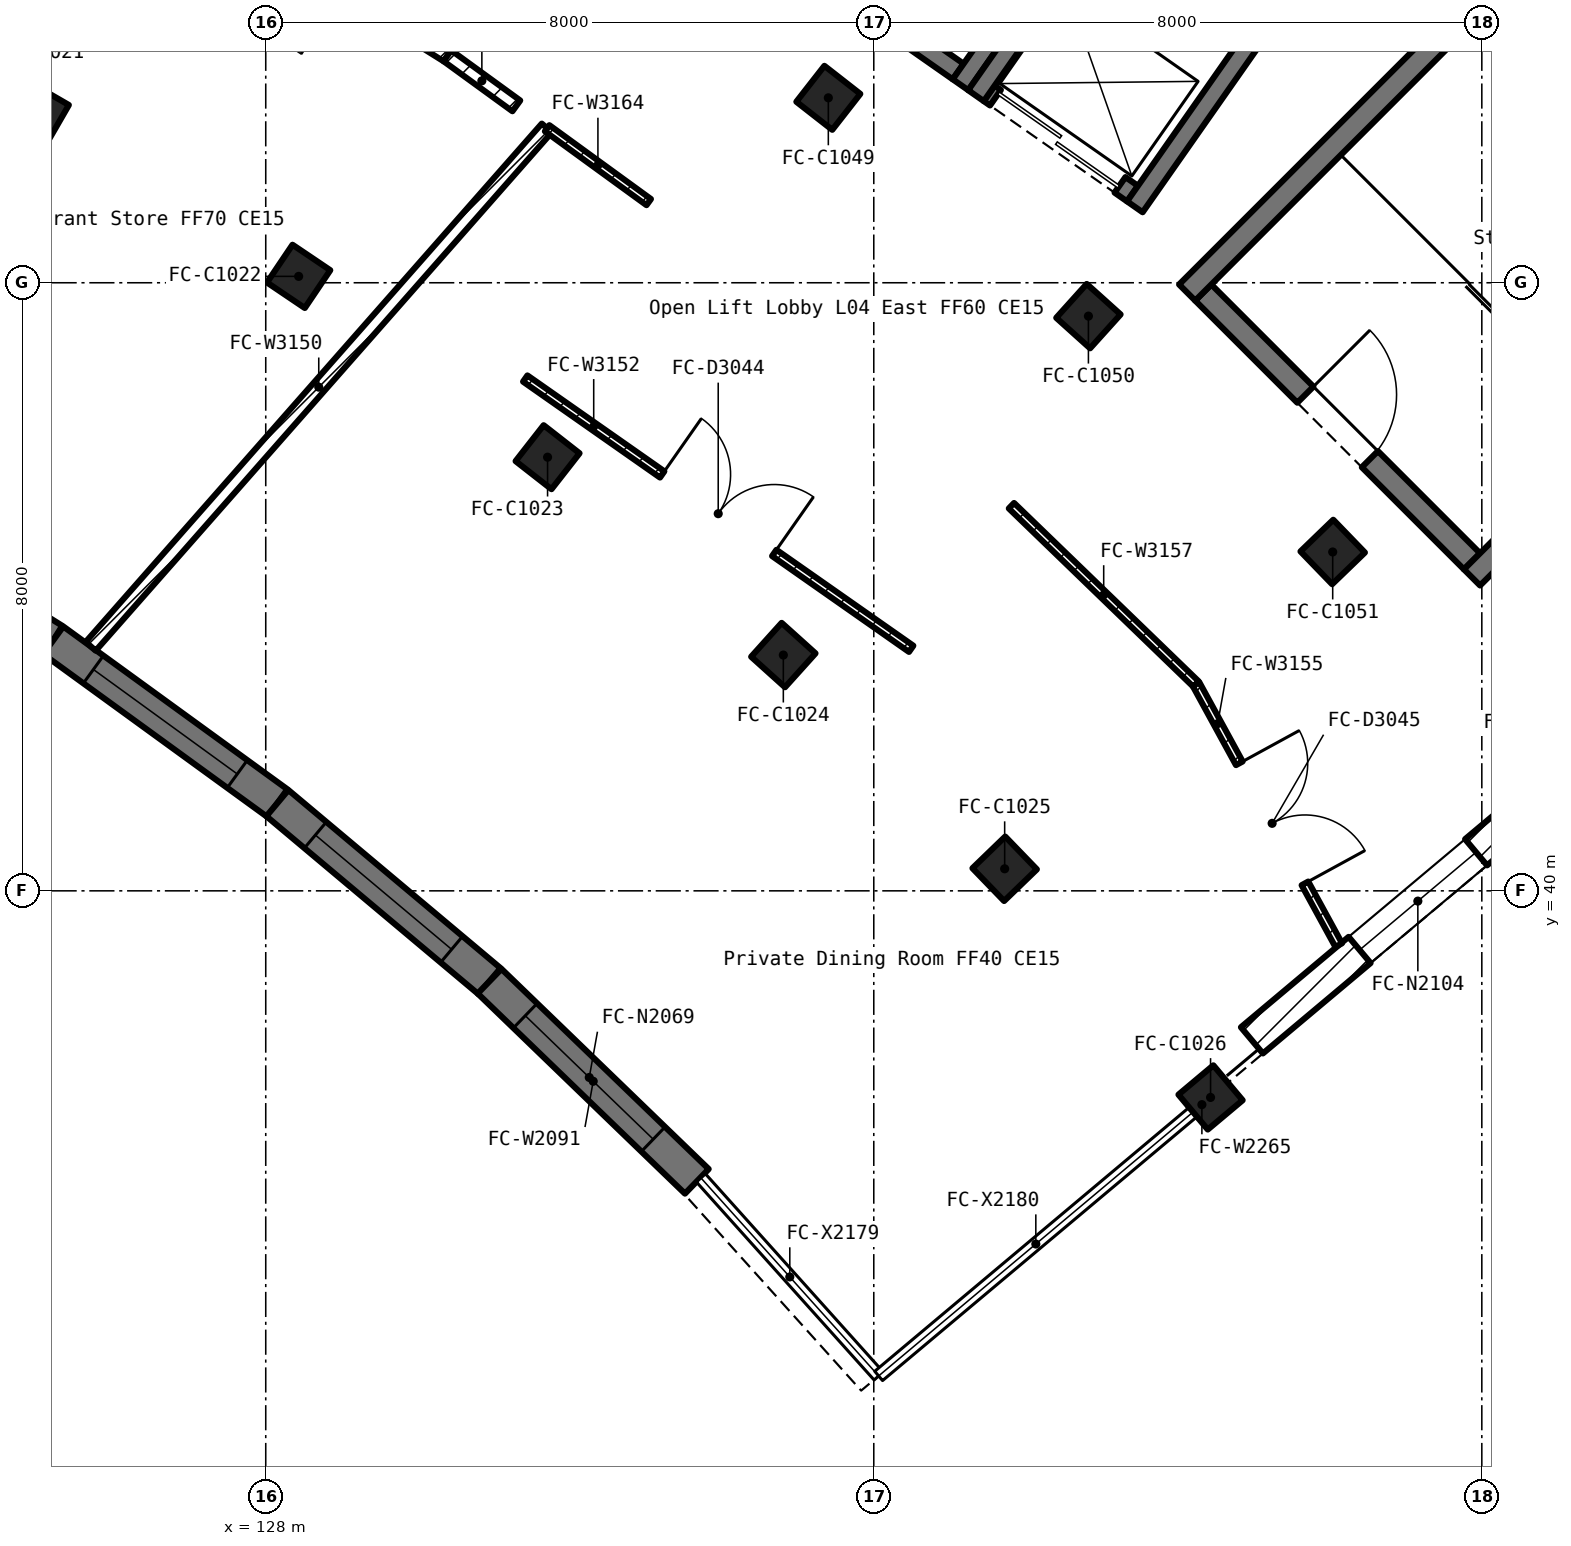
"""IFC4 building model, lengths in metres.
Left out: names, types, materials, properties, quantities, classifications, styles, units other than length and angle.
Written with IfcOpenShell. Run it as: python <this file> out.ifc"""

import sys

from ifc_helpers import new_model, si_unit, direction, frame, frame_2d, origin, origin_2d, place, context, subcontext, project, spatial, rectangle, extrude, element, fill, save


model = new_model("IFC4")
c1 = context("Model", 3, precision=1e-05, world=origin(), true_north=direction((0.0, 1.0)))
c2 = subcontext(c1, "Body", "Model", "MODEL_VIEW")
j1 = project(units=[si_unit("LENGTHUNIT", "METRE"), si_unit("PLANEANGLEUNIT", "RADIAN")], contexts=[c1])
p1 = place(None, origin())
s1 = spatial("IfcSite", under=j1, at=p1, CompositionType="ELEMENT")
p2 = place(p1, origin())
s2 = spatial("IfcBuilding", under=s1, at=p2, CompositionType="ELEMENT")
p3 = place(p2, frame((0.0, 0.0, 22.5)))
s3 = spatial("IfcBuildingStorey", under=s2, at=p3, CompositionType="ELEMENT", Elevation=22.5)
for number, where, z_axis, x_axis in (
    (1, (125.0, 50.229, 0.0), (0.0, 0.0, 1.0), (0.866, -0.5, 0.0)),
    (2, (128.433, 48.084, 0.0), (0.0, 0.0, 1.0), (0.829, -0.559, 0.0)),
    (3, (131.708, 45.705, 0.0), (0.0, 0.0, 1.0), (0.788, -0.616, 0.0)),
    (4, (134.81, 43.102, 0.0), (0.0, 0.0, 1.0), (0.743, -0.669, 0.0)),
    (5, (137.722, 40.29, 0.0), (0.0, 0.0, 1.0), (0.695, -0.719, 0.0)),
    (6, (140.431, 37.282, 0.0), (0.0, 0.0, 1.0), (0.643, -0.766, 0.0)),
    (7, (135.402, 50.433, 0.0), (0.0, 0.0, 1.0), (0.788, -0.616, 0.0)),
    (8, (138.824, 47.561, 0.0), (0.0, 0.0, 1.0), (0.743, -0.669, 0.0)),
    (9, (142.038, 44.458, 0.0), (0.0, 0.0, 1.0), (0.695, -0.719, 0.0)),
):
    element("IfcColumn", number, at=place(p3, frame(where, z_axis=z_axis, x_axis=x_axis)), inside=s3, PredefinedType="COLUMN", context=c2, shape_type="SweptSolid", body=[
        extrude(rectangle(XDim=0.6, YDim=0.6, at=origin_2d()), origin(), (0.0, 0.0, 1.0), 5.5),
    ])
p4 = place(p3, frame((122.112, 45.228, 0.0), z_axis=(0.0, 0.0, 1.0), x_axis=(0.848047203697, -0.529920692464, 0.0)))
e10 = element("IfcWall", 10, at=p4, inside=s3, PredefinedType="SOLIDWALL", context=c2, shape_type="SweptSolid", body=[
    extrude(rectangle(XDim=3.646, YDim=0.45, at=frame_2d((1.823, 0.0))), origin(), (0.0, 0.0, 1.0), 5.5),
])
p5 = place(p4, frame((0.653, 0.0, 1.4)))
e11 = element("IfcOpeningElement", 11, at=p5, cuts=e10, PredefinedType="OPENING", context=c2, shape_type="SweptSolid", body=[
    extrude(rectangle(XDim=2.34, YDim=2.4, at=frame_2d((1.17, 1.2))), frame((0.0, 0.237, 0.0), z_axis=(0.0, -1.0, 0.0), x_axis=(1.0, 0.0, 0.0)), (0.0, 0.0, 1.0), 0.474),
])
p6 = place(p3, frame((125.204, 43.296, 0.0), z_axis=(0.0, 0.0, 1.0), x_axis=(0.809109587744, -0.58765778734, 0.0)))
e12 = element("IfcWall", 12, at=p6, inside=s3, PredefinedType="SOLIDWALL", context=c2, shape_type="SweptSolid", body=[
    extrude(rectangle(XDim=3.645, YDim=0.45, at=frame_2d((1.822, 0.0))), origin(), (0.0, 0.0, 1.0), 5.5),
])
p7 = place(p6, frame((0.653, 0.0, 1.4)))
e13 = element("IfcOpeningElement", 13, at=p7, cuts=e12, PredefinedType="OPENING", context=c2, shape_type="SweptSolid", body=[
    extrude(rectangle(XDim=2.34, YDim=2.4, at=frame_2d((1.17, 1.2))), frame((0.0, 0.237, 0.0), z_axis=(0.0, -1.0, 0.0), x_axis=(1.0, 0.0, 0.0)), (0.0, 0.0, 1.0), 0.474),
])
p8 = place(p3, frame((128.153, 41.154, 0.0), z_axis=(0.0, 0.0, 1.0), x_axis=(0.766009592259, -0.642829141038, 0.0)))
e14 = element("IfcWall", 14, at=p8, inside=s3, PredefinedType="SOLIDWALL", context=c2, shape_type="SweptSolid", body=[
    extrude(rectangle(XDim=3.645, YDim=0.45, at=frame_2d((1.822, 0.0))), origin(), (0.0, 0.0, 1.0), 5.5),
])
p9 = place(p8, frame((0.653, 0.0, 1.4)))
e15 = element("IfcOpeningElement", 15, at=p9, cuts=e14, PredefinedType="OPENING", context=c2, shape_type="SweptSolid", body=[
    extrude(rectangle(XDim=2.34, YDim=2.4, at=frame_2d((1.17, 1.2))), frame((0.0, 0.237, 0.0), z_axis=(0.0, -1.0, 0.0), x_axis=(1.0, 0.0, 0.0)), (0.0, 0.0, 1.0), 0.474),
])
p10 = place(p3, frame((130.945, 38.811, 0.0), z_axis=(0.0, 0.0, 1.0), x_axis=(0.719395911917, -0.694600260522, 0.0)))
e16 = element("IfcWall", 16, at=p10, inside=s3, PredefinedType="SOLIDWALL", context=c2, shape_type="SweptSolid", body=[
    extrude(rectangle(XDim=3.791, YDim=0.45, at=frame_2d((1.896, 0.0))), origin(), (0.0, 0.0, 1.0), 5.5),
])
p11 = place(p10, frame((0.653, 0.0, 1.4)))
e17 = element("IfcOpeningElement", 17, at=p11, cuts=e16, PredefinedType="OPENING", context=c2, shape_type="SweptSolid", body=[
    extrude(rectangle(XDim=2.34, YDim=2.4, at=frame_2d((1.17, 1.2))), frame((0.0, 0.237, 0.0), z_axis=(0.0, -1.0, 0.0), x_axis=(1.0, 0.0, 0.0)), (0.0, 0.0, 1.0), 0.474),
])
p12 = place(p3, frame((140.975, 38.033, 0.0), z_axis=(0.0, 0.0, 1.0), x_axis=(0.766065006368, 0.642763102565, 0.0)))
e18 = element("IfcWall", 18, at=p12, inside=s3, PredefinedType="SOLIDWALL", context=c2, shape_type="SweptSolid", body=[
    extrude(rectangle(XDim=5.7, YDim=0.45, at=frame_2d((2.85, 0.0))), origin(), (0.0, 0.0, 1.0), 4.45),
])
p13 = place(p12, frame((1.85, 0.0, 1.0)))
e19 = element("IfcOpeningElement", 19, at=p13, cuts=e18, PredefinedType="OPENING", context=c2, shape_type="SweptSolid", body=[
    extrude(rectangle(XDim=2.0, YDim=2.8, at=frame_2d((1.0, 1.4))), frame((0.0, 0.237, 0.0), z_axis=(0.0, -1.0, 0.0), x_axis=(1.0, 0.0, 0.0)), (0.0, 0.0, 1.0), 0.474),
])
p14 = place(p3, frame((140.335, 47.871, 0.0), z_axis=(0.0, 0.0, 1.0), x_axis=(0.707106781187, -0.707106781187, 0.0)))
e20 = element("IfcWall", 20, at=p14, inside=s3, PredefinedType="SOLIDWALL", context=c2, shape_type="SweptSolid", body=[
    extrude(rectangle(XDim=5.001, YDim=0.3, at=frame_2d((2.5, 0.0))), origin(), (0.0, 0.0, 1.0), 5.25),
])
p15 = place(p14, frame((1.9, 0.0, 0.0)))
e21 = element("IfcOpeningElement", 21, at=p15, cuts=e20, PredefinedType="OPENING", context=c2, shape_type="SweptSolid", body=[
    extrude(rectangle(XDim=1.2, YDim=2.1, at=frame_2d((0.6, 1.05))), frame((0.0, 0.162, 0.0), z_axis=(0.0, -1.0, 0.0), x_axis=(1.0, 0.0, 0.0)), (0.0, 0.0, 1.0), 0.324),
])
for number, where, z_axis, x_axis in (
    (22, (143.871, 44.123, 0.0), (0.0, 0.0, 1.0), (0.707, 0.707, 0.0)),
    (23, (147.194, 54.942, 0.0), (0.0, 0.0, 1.0), (-0.707, -0.707, 0.0)),
):
    element("IfcWall", number, at=place(p3, frame(where, z_axis=z_axis, x_axis=x_axis)), inside=s3, PredefinedType="SOLIDWALL", context=c2, shape_type="SweptSolid", body=[
        extrude(rectangle(XDim=10.0, YDim=0.3, at=frame_2d((5.0, 0.0))), origin(), (0.0, 0.0, 1.0), 5.25),
    ])
p16 = place(p3, frame((135.225, 52.098, 0.0), z_axis=(0.0, 0.0, 1.0), x_axis=(0.819366508838, -0.573270027295, 0.0)))
e24 = element("IfcWall", 24, at=p16, inside=s3, PredefinedType="SOLIDWALL", context=c2, shape_type="SweptSolid", body=[
    extrude(rectangle(XDim=2.301, YDim=0.25, at=frame_2d((1.15, 0.0))), origin(), (0.0, 0.0, 1.0), 5.25),
])
p17 = place(p3, frame((137.141, 50.605, 0.0), z_axis=(0.0, 0.0, 1.0), x_axis=(0.573572956461, 0.819154480923, 0.0)))
e25 = element("IfcWall", 25, at=p17, inside=s3, PredefinedType="SOLIDWALL", context=c2, shape_type="SweptSolid", body=[
    extrude(rectangle(XDim=4.0, YDim=0.25, at=frame_2d((2.0, 0.0))), origin(), (0.0, 0.0, 1.0), 5.25),
])
p18 = place(p3, frame((137.519, 50.492, 0.0), z_axis=(0.0, 0.0, 1.0), x_axis=(0.819366508838, -0.573270027295, 0.0)))
e26 = element("IfcWall", 26, at=p18, inside=s3, PredefinedType="SOLIDWALL", context=c2, shape_type="SweptSolid", body=[
    extrude(rectangle(XDim=2.301, YDim=0.25, at=frame_2d((1.15, 0.0))), origin(), (0.0, 0.0, 1.0), 5.25),
])
p19 = place(p18, frame((0.1, 0.0, 0.0)))
e27 = element("IfcOpeningElement", 27, at=p19, cuts=e26, PredefinedType="OPENING", context=c2, shape_type="SweptSolid", body=[
    extrude(rectangle(XDim=2.0, YDim=2.2, at=frame_2d((1.0, 1.1))), frame((0.0, 0.137, 0.0), z_axis=(0.0, -1.0, 0.0), x_axis=(1.0, 0.0, 0.0)), (0.0, 0.0, 1.0), 0.274),
])
p20 = place(p3, frame((139.435, 48.999, 0.0), z_axis=(0.0, 0.0, 1.0), x_axis=(0.57360163893, 0.819134396675, 0.0)))
e28 = element("IfcWall", 28, at=p20, inside=s3, PredefinedType="SOLIDWALL", context=c2, shape_type="SweptSolid", body=[
    extrude(rectangle(XDim=3.999, YDim=0.25, at=frame_2d((2.0, 0.0))), origin(), (0.0, 0.0, 1.0), 5.25),
])
p21 = place(p3, frame((139.639, 53.737, 0.0), z_axis=(0.0, 0.0, 1.0), x_axis=(-0.573572956461, -0.819154480923, 0.0)))
e29 = element("IfcWall", 29, at=p21, inside=s3, PredefinedType="SOLIDWALL", context=c2, shape_type="SweptSolid", body=[
    extrude(rectangle(XDim=4.0, YDim=0.25, at=frame_2d((2.0, 0.0))), origin(), (0.0, 0.0, 1.0), 5.25),
])
p22 = place(p3, frame((125.697, 43.217, 0.0), z_axis=(0.0, 0.0, 1.0), x_axis=(0.660652130462, 0.750692188927, 0.0)))
e30 = element("IfcWall", 30, at=p22, inside=s3, PredefinedType="PARTITIONING", context=c2, shape_type="SweptSolid", body=[
    extrude(rectangle(XDim=9.083, YDim=0.175, at=frame_2d((4.542, 0.0))), origin(), (0.0, 0.0, 1.0), 4.35),
])
p23 = place(p3, frame((131.414, 46.74, 0.0), z_axis=(0.0, 0.0, 1.0), x_axis=(0.81912644488, -0.573612994359, 0.0)))
e31 = element("IfcWall", 31, at=p23, inside=s3, PredefinedType="PARTITIONING", context=c2, shape_type="SweptSolid", body=[
    extrude(rectangle(XDim=6.199, YDim=0.1, at=frame_2d((3.1, 0.0))), origin(), (0.0, 0.0, 1.0), 4.35),
])
p24 = place(p23, frame((2.2, 0.0, 0.0)))
e32 = element("IfcOpeningElement", 32, at=p24, cuts=e31, PredefinedType="OPENING", context=c2, shape_type="SweptSolid", body=[
    extrude(rectangle(XDim=1.8, YDim=2.1, at=frame_2d((0.9, 1.05))), frame((0.0, 0.062, 0.0), z_axis=(0.0, -1.0, 0.0), x_axis=(1.0, 0.0, 0.0)), (0.0, 0.0, 1.0), 0.124),
])
p25 = place(p3, frame((130.39, 50.986, 0.0), z_axis=(0.0, 0.0, 1.0), x_axis=(-0.848001499411, 0.52999382732, 0.0)))
e33 = element("IfcWall", 33, at=p25, inside=s3, PredefinedType="PARTITIONING", context=c2, shape_type="SweptSolid", body=[
    extrude(rectangle(XDim=4.292, YDim=0.175, at=frame_2d((2.146, 0.0))), origin(), (0.0, 0.0, 1.0), 4.35),
])
p26 = place(p25, frame((1.646, 0.0, 0.0)))
e34 = element("IfcOpeningElement", 34, at=p26, cuts=e33, PredefinedType="OPENING", context=c2, shape_type="SweptSolid", body=[
    extrude(rectangle(XDim=1.0, YDim=2.1, at=frame_2d((0.5, 1.05))), frame((0.0, 0.1, 0.0), z_axis=(0.0, -1.0, 0.0), x_axis=(1.0, 0.0, 0.0)), (0.0, 0.0, 1.0), 0.199),
])
p27 = place(p3, frame((140.239, 42.721, 0.0), z_axis=(0.0, 0.0, 1.0), x_axis=(0.479690824027, -0.877437583731, 0.0)))
e35 = element("IfcWall", 35, at=p27, inside=s3, PredefinedType="PARTITIONING", context=c2, shape_type="SweptSolid", body=[
    extrude(rectangle(XDim=3.915, YDim=0.1, at=frame_2d((1.958, 0.0))), origin(), (0.0, 0.0, 1.0), 4.35),
])
p28 = place(p27, frame((1.189, 0.0, 0.0)))
e36 = element("IfcOpeningElement", 36, at=p28, cuts=e35, PredefinedType="OPENING", context=c2, shape_type="SweptSolid", body=[
    extrude(rectangle(XDim=1.8, YDim=2.1, at=frame_2d((0.9, 1.05))), frame((0.0, 0.062, 0.0), z_axis=(0.0, -1.0, 0.0), x_axis=(1.0, 0.0, 0.0)), (0.0, 0.0, 1.0), 0.124),
])
p29 = place(p3, frame((137.811, 45.067, 0.0), z_axis=(0.0, 0.0, 1.0), x_axis=(0.719150966755, -0.694853860186, 0.0)))
e37 = element("IfcWall", 37, at=p29, inside=s3, PredefinedType="PARTITIONING", context=c2, shape_type="SweptSolid", body=[
    extrude(rectangle(XDim=3.376, YDim=0.1, at=frame_2d((1.688, 0.0))), origin(), (0.0, 0.0, 1.0), 4.35),
])
p30 = place(p3, frame((131.702, 50.033, 0.0), z_axis=(0.0, 0.0, 1.0), x_axis=(0.808895718894, -0.587952137469, 0.0)))
e38 = element("IfcWall", 38, at=p30, inside=s3, PredefinedType="PARTITIONING", context=c2, shape_type="SweptSolid", body=[
    extrude(rectangle(XDim=1.653, YDim=0.1, at=frame_2d((0.827, 0.0))), origin(), (0.0, 0.0, 1.0), 4.35),
])
p31 = place(p3, frame((131.297, 50.327, 0.0), z_axis=(0.0, 0.0, 1.0), x_axis=(-0.8089996052, 0.587809185694, 0.0)))
e39 = element("IfcWall", 39, at=p31, inside=s3, PredefinedType="PARTITIONING", context=c2, shape_type="SweptSolid", body=[
    extrude(rectangle(XDim=1.121, YDim=0.175, at=frame_2d((0.561, 0.0))), origin(), (0.0, 0.0, 1.0), 4.35),
])
p32 = place(p3, frame((140.2, 37.089, 0.0), z_axis=(0.0, 0.0, 1.0), x_axis=(0.767105498424, 0.641520969485, 0.0)))
e40 = element("IfcWall", 40, at=p32, inside=s3, PredefinedType="SOLIDWALL", context=c2, shape_type="SweptSolid", body=[
    extrude(rectangle(XDim=0.305, YDim=0.18, at=frame_2d((0.153, 0.0))), origin(), (0.0, 0.0, 1.0), 4.65),
])
p33 = place(p7, origin())
e41 = element("IfcWindow", 41, at=p33, inside=s3, PartitioningType="TRIPLE_PANEL_VERTICAL", PredefinedType="WINDOW", context=c2, shape_type="SweptSolid", body=[
    extrude(rectangle(XDim=2.34, YDim=2.4, at=frame_2d((1.17, 1.2))), frame((0.0, 0.03, 0.0), z_axis=(0.0, -1.0, 0.0), x_axis=(1.0, 0.0, 0.0)), (0.0, 0.0, 1.0), 0.06),
])
fill(e13, e41)
p34 = place(p9, origin())
e42 = element("IfcWindow", 42, at=p34, inside=s3, PartitioningType="TRIPLE_PANEL_VERTICAL", PredefinedType="WINDOW", context=c2, shape_type="SweptSolid", body=[
    extrude(rectangle(XDim=2.34, YDim=2.4, at=frame_2d((1.17, 1.2))), frame((0.0, 0.03, 0.0), z_axis=(0.0, -1.0, 0.0), x_axis=(1.0, 0.0, 0.0)), (0.0, 0.0, 1.0), 0.06),
])
fill(e15, e42)
p35 = place(p11, origin())
e43 = element("IfcWindow", 43, at=p35, inside=s3, PartitioningType="TRIPLE_PANEL_VERTICAL", PredefinedType="WINDOW", context=c2, shape_type="SweptSolid", body=[
    extrude(rectangle(XDim=2.34, YDim=2.4, at=frame_2d((1.17, 1.2))), frame((0.0, 0.03, 0.0), z_axis=(0.0, -1.0, 0.0), x_axis=(1.0, 0.0, 0.0)), (0.0, 0.0, 1.0), 0.06),
])
fill(e17, e43)
p36 = place(p13, origin())
e44 = element("IfcWindow", 44, at=p36, inside=s3, PartitioningType="DOUBLE_PANEL_VERTICAL", PredefinedType="WINDOW", context=c2, shape_type="SweptSolid", body=[
    extrude(rectangle(XDim=2.0, YDim=2.8, at=frame_2d((1.0, 1.4))), frame((0.0, 0.03, 0.0), z_axis=(0.0, -1.0, 0.0), x_axis=(1.0, 0.0, 0.0)), (0.0, 0.0, 1.0), 0.06),
])
fill(e19, e44)
p37 = place(p15, origin())
e45 = element("IfcDoor", 45, at=p37, inside=s3, OperationType="SINGLE_SWING_LEFT", PredefinedType="DOOR", context=c2, shape_type="SweptSolid", body=[
    extrude(rectangle(XDim=1.2, YDim=2.1, at=frame_2d((0.6, 1.05))), frame((0.0, 0.025, 0.0), z_axis=(0.0, -1.0, 0.0), x_axis=(1.0, 0.0, 0.0)), (0.0, 0.0, 1.0), 0.05),
])
fill(e21, e45)
p38 = place(p19, origin())
e46 = element("IfcDoor", 46, at=p38, inside=s3, OperationType="DOUBLE_DOOR_SLIDING", PredefinedType="DOOR", context=c2, shape_type="SweptSolid", body=[
    extrude(rectangle(XDim=2.0, YDim=2.2, at=frame_2d((1.0, 1.1))), frame((0.0, 0.025, 0.0), z_axis=(0.0, -1.0, 0.0), x_axis=(1.0, 0.0, 0.0)), (0.0, 0.0, 1.0), 0.05),
])
fill(e27, e46)
p39 = place(p24, origin())
e47 = element("IfcDoor", 47, at=p39, inside=s3, OperationType="DOUBLE_DOOR_SINGLE_SWING", PredefinedType="DOOR", context=c2, shape_type="SweptSolid", body=[
    extrude(rectangle(XDim=1.8, YDim=2.1, at=frame_2d((0.9, 1.05))), frame((0.0, 0.025, 0.0), z_axis=(0.0, -1.0, 0.0), x_axis=(1.0, 0.0, 0.0)), (0.0, 0.0, 1.0), 0.05),
])
fill(e32, e47)
p40 = place(p28, origin())
e48 = element("IfcDoor", 48, at=p40, inside=s3, OperationType="DOUBLE_DOOR_SINGLE_SWING", PredefinedType="DOOR", context=c2, shape_type="SweptSolid", body=[
    extrude(rectangle(XDim=1.8, YDim=2.1, at=frame_2d((0.9, 1.05))), frame((0.0, 0.025, 0.0), z_axis=(0.0, -1.0, 0.0), x_axis=(1.0, 0.0, 0.0)), (0.0, 0.0, 1.0), 0.05),
])
fill(e36, e48)
save(model, sys.argv[1])
